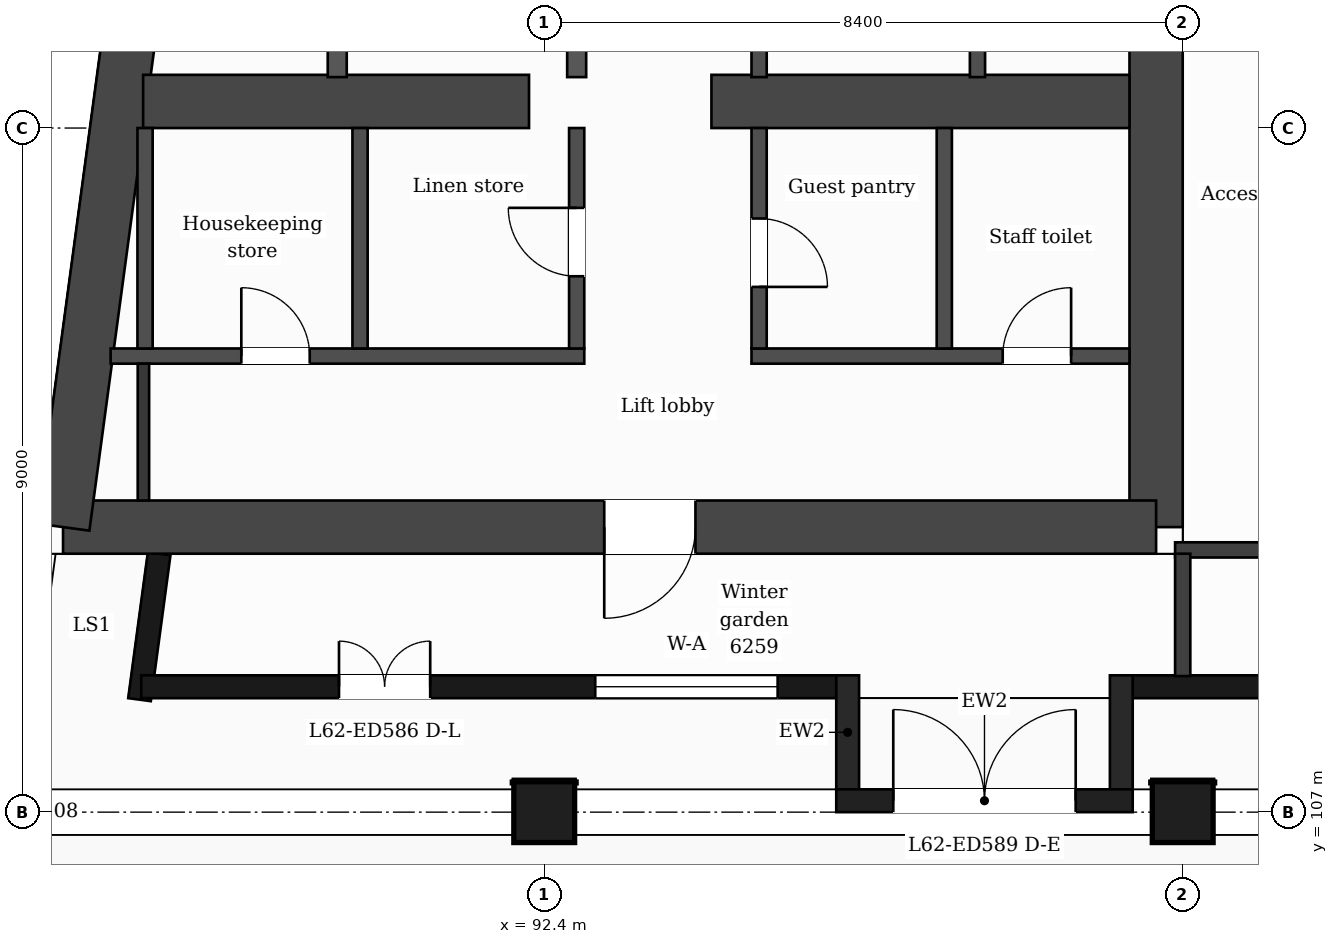
"""IFC4 building model, lengths in metres.
Left out: names, types, materials, properties, quantities, classifications, styles, units other than length and angle.
Written with IfcOpenShell. Run it as: python <this file> out.ifc"""

import sys

from ifc_helpers import new_model, si_unit, direction, frame, frame_2d, origin, origin_2d, place, context, subcontext, project, spatial, rectangle, extrude, element, fill, save


model = new_model("IFC4")
c1 = context("Model", 3, precision=1e-05, world=origin(), true_north=direction((0.0, 1.0)))
c2 = subcontext(c1, "Body", "Model", "MODEL_VIEW")
j1 = project(units=[si_unit("LENGTHUNIT", "METRE"), si_unit("PLANEANGLEUNIT", "RADIAN")], contexts=[c1])
p1 = place(None, origin())
s1 = spatial("IfcSite", under=j1, at=p1, CompositionType="ELEMENT")
p2 = place(p1, origin())
s2 = spatial("IfcBuilding", under=s1, at=p2, CompositionType="ELEMENT")
p3 = place(p2, frame((0.0, 0.0, 259.0)))
s3 = spatial("IfcBuildingStorey", under=s2, at=p3, CompositionType="ELEMENT", Elevation=259.0)
p4 = place(p3, frame((100.45, 132.05, 0.0), z_axis=(0.0, 0.0, 1.0), x_axis=(0.0, -1.0, 0.0)))
e1 = element("IfcWall", 1, at=p4, inside=s3, PredefinedType="SHEAR", context=c2, shape_type="SweptSolid", body=[
    extrude(rectangle(XDim=21.3, YDim=0.7, at=frame_2d((10.65, 0.0))), origin(), (0.0, 0.0, 1.0), 3.7),
])
p5 = place(p4, frame((7.9, 0.0, 0.0)))
e2 = element("IfcOpeningElement", 2, at=p5, cuts=e1, PredefinedType="OPENING", context=c2, shape_type="SweptSolid", body=[
    extrude(rectangle(XDim=1.4, YDim=2.1, at=frame_2d((0.7, 1.05))), frame((0.0, 0.36, 0.0), z_axis=(0.0, -1.0, 0.0), x_axis=(1.0, 0.0, 0.0)), (0.0, 0.0, 1.0), 0.72),
])
p6 = place(p3, frame((100.45, 110.75, 0.0), z_axis=(0.0, 0.0, 1.0), x_axis=(-1.0, 0.0, 0.0)))
e3 = element("IfcWall", 3, at=p6, inside=s3, PredefinedType="SHEAR", context=c2, shape_type="SweptSolid", body=[
    extrude(rectangle(XDim=14.38, YDim=0.7, at=frame_2d((7.19, 0.0))), origin(), (0.0, 0.0, 1.0), 3.7),
])
p7 = place(p6, frame((6.06, 0.0, 0.0)))
e4 = element("IfcOpeningElement", 4, at=p7, cuts=e3, PredefinedType="OPENING", context=c2, shape_type="SweptSolid", body=[
    extrude(rectangle(XDim=1.2, YDim=2.1, at=frame_2d((0.6, 1.05))), frame((0.0, 0.36, 0.0), z_axis=(0.0, -1.0, 0.0), x_axis=(1.0, 0.0, 0.0)), (0.0, 0.0, 1.0), 0.72),
])
p8 = place(p3, frame((86.07, 110.75, 0.0), z_axis=(0.0, 0.0, 1.0), x_axis=(0.133406218907, 0.991061441464, 0.0)))
e5 = element("IfcWall", 5, at=p8, inside=s3, PredefinedType="SHEAR", context=c2, shape_type="SweptSolid", body=[
    extrude(rectangle(XDim=21.492, YDim=0.7, at=frame_2d((10.746, 0.0))), origin(), (0.0, 0.0, 1.0), 3.7),
])
p9 = place(p3, frame((87.123, 116.35, 0.0), z_axis=(0.0, 0.0, 1.0), x_axis=(1.0, 0.0, 0.0)))
e6 = element("IfcWall", 6, at=p9, inside=s3, PredefinedType="SHEAR", context=c2, shape_type="SweptSolid", body=[
    extrude(rectangle(XDim=5.077, YDim=0.7, at=frame_2d((2.539, 0.0))), origin(), (0.0, 0.0, 1.0), 3.7),
])
p10 = place(p3, frame((94.6, 116.35, 0.0), z_axis=(0.0, 0.0, 1.0), x_axis=(1.0, 0.0, 0.0)))
e7 = element("IfcWall", 7, at=p10, inside=s3, PredefinedType="SHEAR", context=c2, shape_type="SweptSolid", body=[
    extrude(rectangle(XDim=5.5, YDim=0.7, at=frame_2d((2.75, 0.0))), origin(), (0.0, 0.0, 1.0), 3.7),
])
for number, where, z_axis, x_axis in (
    (8, (92.4, 107.0, 0.0), (0.0, 0.0, 1.0), (1.0, 0.0, 0.0)),
    (9, (100.8, 107.0, 0.0), (0.0, 0.0, 1.0), (1.0, 0.0, 0.0)),
):
    element("IfcColumn", number, at=place(p3, frame(where, z_axis=z_axis, x_axis=x_axis)), inside=s3, PredefinedType="COLUMN", context=c2, shape_type="SweptSolid", body=[
        extrude(rectangle(XDim=0.8, YDim=0.8, at=origin_2d()), origin(), (0.0, 0.0, 1.0), 3.7),
    ])
p11 = place(p3, frame((87.334, 110.4, 0.0), z_axis=(0.0, 0.0, 1.0), x_axis=(-0.13345962011, -0.991054251694, 0.0)))
e10 = element("IfcWall", 10, at=p11, inside=s3, PredefinedType="SOLIDWALL", context=c2, shape_type="SweptSolid", body=[
    extrude(rectangle(XDim=1.937, YDim=0.3, at=frame_2d((0.969, 0.0))), origin(), (0.0, 0.0, 1.0), 3.38),
])
p12 = place(p3, frame((87.099, 108.65, 0.0), z_axis=(0.0, 0.0, 1.0), x_axis=(1.0, 0.0, 0.0)))
e11 = element("IfcWall", 11, at=p12, inside=s3, PredefinedType="SOLIDWALL", context=c2, shape_type="SweptSolid", body=[
    extrude(rectangle(XDim=9.144, YDim=0.3, at=frame_2d((4.572, 0.0))), origin(), (0.0, 0.0, 1.0), 3.38),
])
p13 = place(p12, frame((2.602, 0.0, 0.0)))
e12 = element("IfcOpeningElement", 12, at=p13, cuts=e11, PredefinedType="OPENING", context=c2, shape_type="SweptSolid", body=[
    extrude(rectangle(XDim=1.2, YDim=2.4, at=frame_2d((0.6, 1.2))), frame((0.0, 0.16, 0.0), z_axis=(0.0, -1.0, 0.0), x_axis=(1.0, 0.0, 0.0)), (0.0, 0.0, 1.0), 0.32),
])
p14 = place(p12, frame((5.973, 0.0, 0.9)))
e13 = element("IfcOpeningElement", 13, at=p14, cuts=e11, PredefinedType="OPENING", context=c2, shape_type="SweptSolid", body=[
    extrude(rectangle(XDim=2.4, YDim=2.1, at=frame_2d((1.2, 1.05))), frame((0.0, 0.16, 0.0), z_axis=(0.0, -1.0, 0.0), x_axis=(1.0, 0.0, 0.0)), (0.0, 0.0, 1.0), 0.32),
])
p15 = place(p3, frame((100.142, 108.65, 0.0), z_axis=(0.0, 0.0, 1.0), x_axis=(1.0, 0.0, 0.0)))
e14 = element("IfcWall", 14, at=p15, inside=s3, PredefinedType="SOLIDWALL", context=c2, shape_type="SweptSolid", body=[
    extrude(rectangle(XDim=26.687, YDim=0.3, at=frame_2d((13.344, 0.0))), origin(), (0.0, 0.0, 1.0), 3.38),
])
p16 = place(p15, frame((2.158, 0.0, 0.9)))
e15 = element("IfcOpeningElement", 15, at=p16, cuts=e14, PredefinedType="OPENING", context=c2, shape_type="SweptSolid", body=[
    extrude(rectangle(XDim=1.2, YDim=2.1, at=frame_2d((0.6, 1.05))), frame((0.0, 0.16, 0.0), z_axis=(0.0, -1.0, 0.0), x_axis=(1.0, 0.0, 0.0)), (0.0, 0.0, 1.0), 0.32),
])
p17 = place(p15, frame((5.758, 0.0, 0.9)))
e16 = element("IfcOpeningElement", 16, at=p17, cuts=e14, PredefinedType="OPENING", context=c2, shape_type="SweptSolid", body=[
    extrude(rectangle(XDim=2.4, YDim=2.1, at=frame_2d((1.2, 1.05))), frame((0.0, 0.16, 0.0), z_axis=(0.0, -1.0, 0.0), x_axis=(1.0, 0.0, 0.0)), (0.0, 0.0, 1.0), 0.32),
])
p18 = place(p15, frame((9.958, 0.0, 0.9)))
e17 = element("IfcOpeningElement", 17, at=p18, cuts=e14, PredefinedType="OPENING", context=c2, shape_type="SweptSolid", body=[
    extrude(rectangle(XDim=2.4, YDim=2.1, at=frame_2d((1.2, 1.05))), frame((0.0, 0.16, 0.0), z_axis=(0.0, -1.0, 0.0), x_axis=(1.0, 0.0, 0.0)), (0.0, 0.0, 1.0), 0.32),
])
p19 = place(p15, frame((14.758, 0.0, 0.0)))
e18 = element("IfcOpeningElement", 18, at=p19, cuts=e14, PredefinedType="OPENING", context=c2, shape_type="SweptSolid", body=[
    extrude(rectangle(XDim=1.2, YDim=2.4, at=frame_2d((0.6, 1.2))), frame((0.0, 0.16, 0.0), z_axis=(0.0, -1.0, 0.0), x_axis=(1.0, 0.0, 0.0)), (0.0, 0.0, 1.0), 0.32),
])
p20 = place(p15, frame((18.358, 0.0, 0.9)))
e19 = element("IfcOpeningElement", 19, at=p20, cuts=e14, PredefinedType="OPENING", context=c2, shape_type="SweptSolid", body=[
    extrude(rectangle(XDim=2.4, YDim=2.1, at=frame_2d((1.2, 1.05))), frame((0.0, 0.16, 0.0), z_axis=(0.0, -1.0, 0.0), x_axis=(1.0, 0.0, 0.0)), (0.0, 0.0, 1.0), 0.32),
])
p21 = place(p15, frame((22.558, 0.0, 0.9)))
e20 = element("IfcOpeningElement", 20, at=p21, cuts=e14, PredefinedType="OPENING", context=c2, shape_type="SweptSolid", body=[
    extrude(rectangle(XDim=2.4, YDim=2.1, at=frame_2d((1.2, 1.05))), frame((0.0, 0.16, 0.0), z_axis=(0.0, -1.0, 0.0), x_axis=(1.0, 0.0, 0.0)), (0.0, 0.0, 1.0), 0.32),
])
for number, where, z_axis, x_axis in (
    (21, (96.392, 108.8, 0.0), (0.0, 0.0, 1.0), (0.0, -1.0, 0.0)),
    (22, (99.992, 108.8, 0.0), (0.0, 0.0, 1.0), (0.0, -1.0, 0.0)),
):
    element("IfcWall", number, at=place(p3, frame(where, z_axis=z_axis, x_axis=x_axis)), inside=s3, PredefinedType="SOLIDWALL", context=c2, shape_type="SweptSolid", body=[
        extrude(rectangle(XDim=1.5, YDim=0.3, at=frame_2d((0.75, 0.0))), origin(), (0.0, 0.0, 1.0), 3.38),
    ])
p22 = place(p3, frame((96.242, 107.15, 0.0), z_axis=(0.0, 0.0, 1.0), x_axis=(1.0, 0.0, 0.0)))
e23 = element("IfcWall", 23, at=p22, inside=s3, PredefinedType="SOLIDWALL", context=c2, shape_type="SweptSolid", body=[
    extrude(rectangle(XDim=3.9, YDim=0.3, at=frame_2d((1.95, 0.0))), origin(), (0.0, 0.0, 1.0), 2.8),
])
p23 = place(p22, frame((0.75, 0.0, 0.0)))
e24 = element("IfcOpeningElement", 24, at=p23, cuts=e23, PredefinedType="OPENING", context=c2, shape_type="SweptSolid", body=[
    extrude(rectangle(XDim=2.4, YDim=2.4, at=frame_2d((1.2, 1.2))), frame((0.0, 0.16, 0.0), z_axis=(0.0, -1.0, 0.0), x_axis=(1.0, 0.0, 0.0)), (0.0, 0.0, 1.0), 0.32),
])
p24 = place(p3, frame((100.7, 110.45, 0.0), z_axis=(0.0, 0.0, 1.0), x_axis=(1.0, 0.0, 0.0)))
e25 = element("IfcWall", 25, at=p24, inside=s3, PredefinedType="PARTITIONING", context=c2, shape_type="SweptSolid", body=[
    extrude(rectangle(XDim=25.4, YDim=0.2, at=frame_2d((12.7, 0.0))), origin(), (0.0, 0.0, 1.0), 3.38),
])
p25 = place(p3, frame((86.696, 113.0, 0.0), z_axis=(0.0, 0.0, 1.0), x_axis=(1.0, 0.0, 0.0)))
e26 = element("IfcWall", 26, at=p25, inside=s3, PredefinedType="PARTITIONING", context=c2, shape_type="SweptSolid", body=[
    extrude(rectangle(XDim=6.231, YDim=0.2, at=frame_2d((3.116, 0.0))), origin(), (0.0, 0.0, 1.0), 3.38),
])
p26 = place(p25, frame((1.719, 0.0, 0.0)))
e27 = element("IfcOpeningElement", 27, at=p26, cuts=e26, PredefinedType="OPENING", context=c2, shape_type="SweptSolid", body=[
    extrude(rectangle(XDim=0.9, YDim=2.1, at=frame_2d((0.45, 1.05))), frame((0.0, 0.11, 0.0), z_axis=(0.0, -1.0, 0.0), x_axis=(1.0, 0.0, 0.0)), (0.0, 0.0, 1.0), 0.22),
])
p27 = place(p3, frame((95.127, 113.0, 0.0), z_axis=(0.0, 0.0, 1.0), x_axis=(1.0, 0.0, 0.0)))
e28 = element("IfcWall", 28, at=p27, inside=s3, PredefinedType="PARTITIONING", context=c2, shape_type="SweptSolid", body=[
    extrude(rectangle(XDim=4.973, YDim=0.2, at=frame_2d((2.487, 0.0))), origin(), (0.0, 0.0, 1.0), 3.38),
])
p28 = place(p27, frame((3.305, 0.0, 0.0)))
e29 = element("IfcOpeningElement", 29, at=p28, cuts=e28, PredefinedType="OPENING", context=c2, shape_type="SweptSolid", body=[
    extrude(rectangle(XDim=0.9, YDim=2.1, at=frame_2d((0.45, 1.05))), frame((0.0, 0.11, 0.0), z_axis=(0.0, -1.0, 0.0), x_axis=(1.0, 0.0, 0.0)), (0.0, 0.0, 1.0), 0.22),
])
p29 = place(p3, frame((87.148, 113.1, 0.0), z_axis=(0.0, 0.0, 1.0), x_axis=(0.0, 1.0, 0.0)))
e30 = element("IfcWall", 30, at=p29, inside=s3, PredefinedType="PARTITIONING", context=c2, shape_type="SweptSolid", body=[
    extrude(rectangle(XDim=2.9, YDim=0.2, at=frame_2d((1.45, 0.0))), origin(), (0.0, 0.0, 1.0), 3.38),
])
p30 = place(p3, frame((87.127, 111.1, 0.0), z_axis=(0.0, 0.0, 1.0), x_axis=(0.0, 1.0, 0.0)))
e31 = element("IfcWall", 31, at=p30, inside=s3, PredefinedType="PARTITIONING", context=c2, shape_type="SweptSolid", body=[
    extrude(rectangle(XDim=1.8, YDim=0.15, at=frame_2d((0.9, 0.0))), origin(), (0.0, 0.0, 1.0), 3.38),
])
p31 = place(p3, frame((89.677, 116.67, 0.0), z_axis=(0.0, 0.0, 1.0), x_axis=(0.0, 1.0, 0.0)))
e32 = element("IfcWall", 32, at=p31, inside=s3, PredefinedType="PARTITIONING", context=c2, shape_type="SweptSolid", body=[
    extrude(rectangle(XDim=7.155, YDim=0.25, at=frame_2d((3.578, 0.0))), origin(), (0.0, 0.0, 1.0), 3.38),
])
p32 = place(p3, frame((89.977, 113.1, 0.0), z_axis=(0.0, 0.0, 1.0), x_axis=(0.0, 1.0, 0.0)))
e33 = element("IfcWall", 33, at=p32, inside=s3, PredefinedType="PARTITIONING", context=c2, shape_type="SweptSolid", body=[
    extrude(rectangle(XDim=2.9, YDim=0.2, at=frame_2d((1.45, 0.0))), origin(), (0.0, 0.0, 1.0), 3.38),
])
p33 = place(p3, frame((92.827, 113.1, 0.0), z_axis=(0.0, 0.0, 1.0), x_axis=(0.0, 1.0, 0.0)))
e34 = element("IfcWall", 34, at=p33, inside=s3, PredefinedType="PARTITIONING", context=c2, shape_type="SweptSolid", body=[
    extrude(rectangle(XDim=2.9, YDim=0.2, at=frame_2d((1.45, 0.0))), origin(), (0.0, 0.0, 1.0), 3.38),
])
p34 = place(p33, frame((0.95, 0.0, 0.0)))
e35 = element("IfcOpeningElement", 35, at=p34, cuts=e34, PredefinedType="OPENING", context=c2, shape_type="SweptSolid", body=[
    extrude(rectangle(XDim=0.9, YDim=2.1, at=frame_2d((0.45, 1.05))), frame((0.0, 0.11, 0.0), z_axis=(0.0, -1.0, 0.0), x_axis=(1.0, 0.0, 0.0)), (0.0, 0.0, 1.0), 0.22),
])
p35 = place(p3, frame((92.827, 116.67, 0.0), z_axis=(0.0, 0.0, 1.0), x_axis=(0.0, 1.0, 0.0)))
e36 = element("IfcWall", 36, at=p35, inside=s3, PredefinedType="PARTITIONING", context=c2, shape_type="SweptSolid", body=[
    extrude(rectangle(XDim=7.155, YDim=0.25, at=frame_2d((3.578, 0.0))), origin(), (0.0, 0.0, 1.0), 3.38),
])
p36 = place(p35, frame((5.855, 0.0, 0.0)))
e37 = element("IfcOpeningElement", 37, at=p36, cuts=e36, PredefinedType="OPENING", context=c2, shape_type="SweptSolid", body=[
    extrude(rectangle(XDim=0.95, YDim=2.1, at=frame_2d((0.475, 1.05))), frame((0.0, 0.135, 0.0), z_axis=(0.0, -1.0, 0.0), x_axis=(1.0, 0.0, 0.0)), (0.0, 0.0, 1.0), 0.27),
])
p37 = place(p3, frame((95.227, 113.1, 0.0), z_axis=(0.0, 0.0, 1.0), x_axis=(0.0, 1.0, 0.0)))
e38 = element("IfcWall", 38, at=p37, inside=s3, PredefinedType="PARTITIONING", context=c2, shape_type="SweptSolid", body=[
    extrude(rectangle(XDim=2.9, YDim=0.2, at=frame_2d((1.45, 0.0))), origin(), (0.0, 0.0, 1.0), 3.38),
])
p38 = place(p37, frame((0.81, 0.0, 0.0)))
e39 = element("IfcOpeningElement", 39, at=p38, cuts=e38, PredefinedType="OPENING", context=c2, shape_type="SweptSolid", body=[
    extrude(rectangle(XDim=0.9, YDim=2.1, at=frame_2d((0.45, 1.05))), frame((0.0, 0.11, 0.0), z_axis=(0.0, -1.0, 0.0), x_axis=(1.0, 0.0, 0.0)), (0.0, 0.0, 1.0), 0.22),
])
p39 = place(p3, frame((95.227, 116.67, 0.0), z_axis=(0.0, 0.0, 1.0), x_axis=(0.0, 1.0, 0.0)))
e40 = element("IfcWall", 40, at=p39, inside=s3, PredefinedType="PARTITIONING", context=c2, shape_type="SweptSolid", body=[
    extrude(rectangle(XDim=5.33, YDim=0.2, at=frame_2d((2.665, 0.0))), origin(), (0.0, 0.0, 1.0), 3.38),
])
p40 = place(p39, frame((0.88, 0.0, 0.0)))
e41 = element("IfcOpeningElement", 41, at=p40, cuts=e40, PredefinedType="OPENING", context=c2, shape_type="SweptSolid", body=[
    extrude(rectangle(XDim=0.9, YDim=2.1, at=frame_2d((0.45, 1.05))), frame((0.0, 0.11, 0.0), z_axis=(0.0, -1.0, 0.0), x_axis=(1.0, 0.0, 0.0)), (0.0, 0.0, 1.0), 0.22),
])
p41 = place(p3, frame((97.664, 113.1, 0.0), z_axis=(0.0, 0.0, 1.0), x_axis=(0.0, 1.0, 0.0)))
e42 = element("IfcWall", 42, at=p41, inside=s3, PredefinedType="PARTITIONING", context=c2, shape_type="SweptSolid", body=[
    extrude(rectangle(XDim=2.9, YDim=0.2, at=frame_2d((1.45, 0.0))), origin(), (0.0, 0.0, 1.0), 3.38),
])
p42 = place(p3, frame((98.1, 116.67, 0.0), z_axis=(0.0, 0.0, 1.0), x_axis=(0.0, 1.0, 0.0)))
e43 = element("IfcWall", 43, at=p42, inside=s3, PredefinedType="PARTITIONING", context=c2, shape_type="SweptSolid", body=[
    extrude(rectangle(XDim=2.03, YDim=0.2, at=frame_2d((1.015, 0.0))), origin(), (0.0, 0.0, 1.0), 3.38),
])
p43 = place(p3, frame((100.8, 108.79, 0.0), z_axis=(0.0, 0.0, 1.0), x_axis=(0.0, 1.0, 0.0)))
e44 = element("IfcWall", 44, at=p43, inside=s3, PredefinedType="PARTITIONING", context=c2, shape_type="SweptSolid", body=[
    extrude(rectangle(XDim=1.61, YDim=0.2, at=frame_2d((0.805, 0.0))), origin(), (0.0, 0.0, 1.0), 3.38),
])
p44 = place(p13, origin())
e45 = element("IfcDoor", 45, at=p44, inside=s3, OperationType="DOUBLE_DOOR_SINGLE_SWING", PredefinedType="DOOR", context=c2, shape_type="SweptSolid", body=[
    extrude(rectangle(XDim=1.2, YDim=2.4, at=frame_2d((0.6, 1.2))), frame((0.0, 0.025, 0.0), z_axis=(0.0, -1.0, 0.0), x_axis=(1.0, 0.0, 0.0)), (0.0, 0.0, 1.0), 0.05),
])
fill(e12, e45)
p45 = place(p14, origin())
e46 = element("IfcWindow", 46, at=p45, inside=s3, PartitioningType="SINGLE_PANEL", PredefinedType="WINDOW", context=c2, shape_type="SweptSolid", body=[
    extrude(rectangle(XDim=2.4, YDim=2.1, at=frame_2d((1.2, 1.05))), frame((0.0, 0.03, 0.0), z_axis=(0.0, -1.0, 0.0), x_axis=(1.0, 0.0, 0.0)), (0.0, 0.0, 1.0), 0.06),
])
fill(e13, e46)
p46 = place(p23, origin())
e47 = element("IfcDoor", 47, at=p46, inside=s3, OperationType="DOUBLE_DOOR_DOUBLE_SWING", PredefinedType="DOOR", context=c2, shape_type="SweptSolid", body=[
    extrude(rectangle(XDim=2.4, YDim=2.4, at=frame_2d((1.2, 1.2))), frame((0.0, 0.025, 0.0), z_axis=(0.0, -1.0, 0.0), x_axis=(1.0, 0.0, 0.0)), (0.0, 0.0, 1.0), 0.05),
])
fill(e24, e47)
p47 = place(p26, origin())
e48 = element("IfcDoor", 48, at=p47, inside=s3, OperationType="SINGLE_SWING_LEFT", PredefinedType="DOOR", context=c2, shape_type="SweptSolid", body=[
    extrude(rectangle(XDim=0.9, YDim=2.1, at=frame_2d((0.45, 1.05))), frame((0.0, 0.025, 0.0), z_axis=(0.0, -1.0, 0.0), x_axis=(1.0, 0.0, 0.0)), (0.0, 0.0, 1.0), 0.05),
])
fill(e27, e48)
p48 = place(p34, origin())
e49 = element("IfcDoor", 49, at=p48, inside=s3, OperationType="SINGLE_SWING_RIGHT", PredefinedType="DOOR", context=c2, shape_type="SweptSolid", body=[
    extrude(rectangle(XDim=0.9, YDim=2.1, at=frame_2d((0.45, 1.05))), frame((0.0, 0.025, 0.0), z_axis=(0.0, -1.0, 0.0), x_axis=(1.0, 0.0, 0.0)), (0.0, 0.0, 1.0), 0.05),
])
fill(e35, e49)
p49 = place(p38, origin())
e50 = element("IfcDoor", 50, at=p49, inside=s3, OperationType="SINGLE_SWING_LEFT", PredefinedType="DOOR", context=c2, shape_type="SweptSolid", body=[
    extrude(rectangle(XDim=0.9, YDim=2.1, at=frame_2d((0.45, 1.05))), frame((0.0, 0.025, 0.0), z_axis=(0.0, -1.0, 0.0), x_axis=(1.0, 0.0, 0.0)), (0.0, 0.0, 1.0), 0.05),
])
fill(e39, e50)
p50 = place(p28, origin())
e51 = element("IfcDoor", 51, at=p50, inside=s3, OperationType="SINGLE_SWING_RIGHT", PredefinedType="DOOR", context=c2, shape_type="SweptSolid", body=[
    extrude(rectangle(XDim=0.9, YDim=2.1, at=frame_2d((0.45, 1.05))), frame((0.0, 0.025, 0.0), z_axis=(0.0, -1.0, 0.0), x_axis=(1.0, 0.0, 0.0)), (0.0, 0.0, 1.0), 0.05),
])
fill(e29, e51)
p51 = place(p7, origin())
e52 = element("IfcDoor", 52, at=p51, inside=s3, OperationType="SINGLE_SWING_RIGHT", PredefinedType="DOOR", context=c2, shape_type="SweptSolid", body=[
    extrude(rectangle(XDim=1.2, YDim=2.1, at=frame_2d((0.6, 1.05))), frame((0.0, 0.025, 0.0), z_axis=(0.0, -1.0, 0.0), x_axis=(1.0, 0.0, 0.0)), (0.0, 0.0, 1.0), 0.05),
])
fill(e4, e52)
save(model, sys.argv[1])
